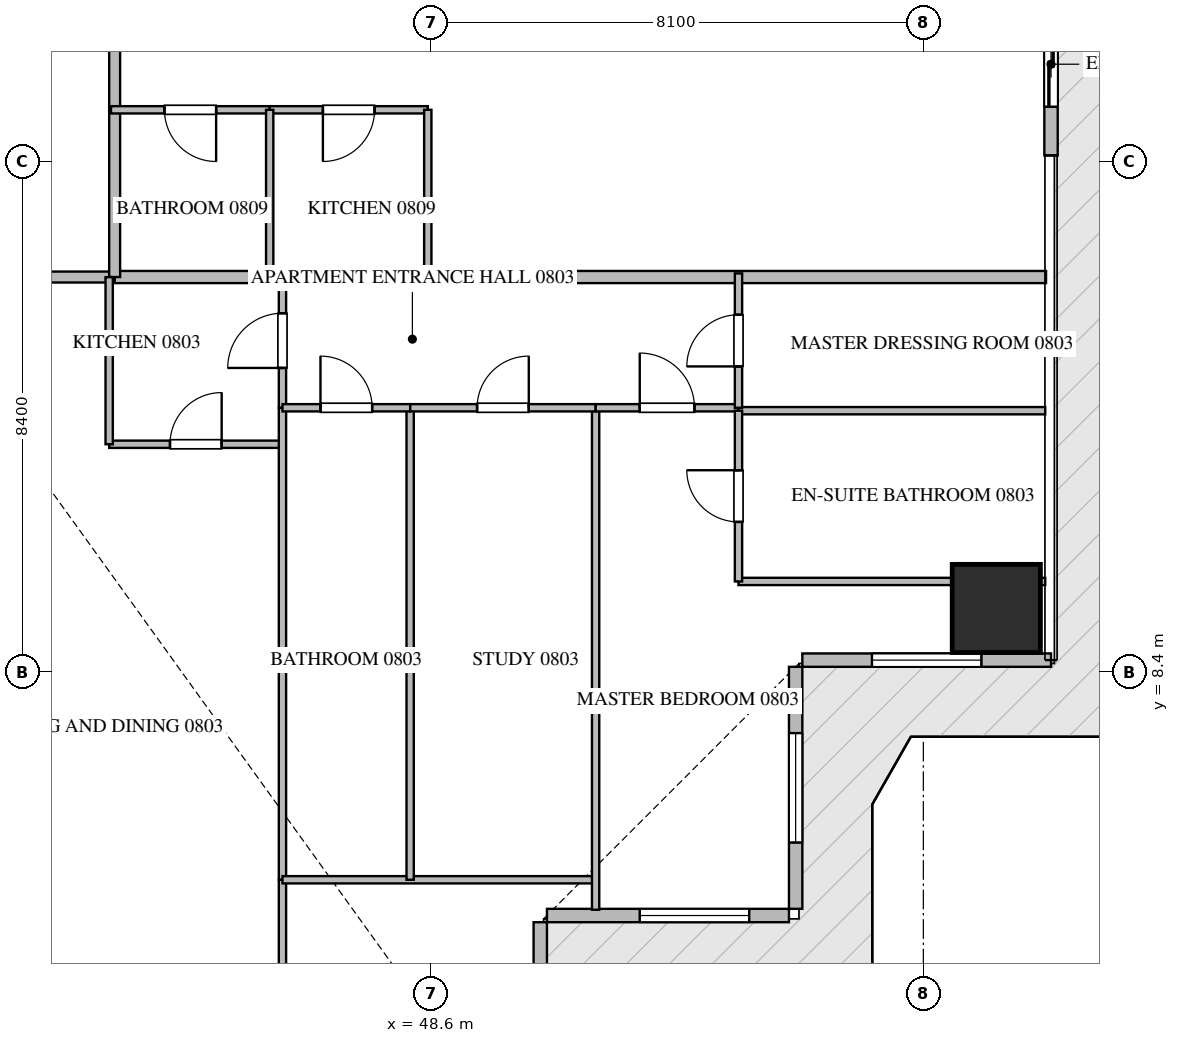
"""IFC4 building model, lengths in metres.
Left out: names, types, materials, properties, quantities, classifications, styles, units other than length and angle.
Written with IfcOpenShell. Run it as: python <this file> out.ifc"""

import sys

from ifc_helpers import new_model, si_unit, direction, frame, frame_2d, origin, origin_2d, place, context, subcontext, project, spatial, rectangle, extrude, source, transform, mapped, element, fill, save


model = new_model("IFC4")
c1 = context("Model", 3, precision=1e-05, world=origin(), true_north=direction((0.0, 1.0)))
c2 = subcontext(c1, "Body", "Model", "MODEL_VIEW")
j1 = project(units=[si_unit("LENGTHUNIT", "METRE"), si_unit("PLANEANGLEUNIT", "RADIAN")], contexts=[c1])
p1 = place(None, origin())
s1 = spatial("IfcSite", under=j1, at=p1, CompositionType="ELEMENT")
p2 = place(p1, origin())
s2 = spatial("IfcBuilding", under=s1, at=p2, CompositionType="ELEMENT")
p3 = place(p2, frame((0.0, 0.0, 37.95)))
s3 = spatial("IfcBuildingStorey", under=s2, at=p3, CompositionType="ELEMENT", Elevation=37.95)
m1 = source(origin(), c2, "Body", "SweptSolid", [
    extrude(rectangle(XDim=1.45, YDim=1.45, at=origin_2d()), origin(), (0.0, 0.0, 1.0), 3.75),
])
p4 = place(p3, frame((57.9, 9.45, -0.26), z_axis=(0.0, 0.0, 1.0), x_axis=(1.0, 0.0, 0.0)))
e1 = element("IfcColumn", 1, at=p4, inside=s3, PredefinedType="COLUMN", context=c2, shape_type="MappedRepresentation", body=[
    mapped(m1, transform((0.0, 0.0, 0.0), scale=1.0)),
])
p5 = place(p3, frame((50.4, 0.2, 0.0), z_axis=(0.0, 0.0, 1.0), x_axis=(0.0, 1.0, 0.0)))
e2 = element("IfcWall", 2, at=p5, inside=s3, PredefinedType="ELEMENTEDWALL", context=c2, shape_type="SweptSolid", body=[
    extrude(rectangle(XDim=4.09, YDim=0.22, at=frame_2d((2.045, 0.0))), origin(), (0.0, 0.0, 1.0), 3.475),
])
p6 = place(p5, frame((1.145, 0.0, 0.65)))
e3 = element("IfcOpeningElement", 3, at=p6, cuts=e2, PredefinedType="OPENING", context=c2, shape_type="SweptSolid", body=[
    extrude(rectangle(XDim=1.8, YDim=2.1, at=frame_2d((0.9, 1.05))), frame((0.0, 0.12, 0.0), z_axis=(0.0, -1.0, 0.0), x_axis=(1.0, 0.0, 0.0)), (0.0, 0.0, 1.0), 0.24),
])
p7 = place(p3, frame((50.51, 4.4, 0.0), z_axis=(0.0, 0.0, 1.0), x_axis=(1.0, 0.0, 0.0)))
e4 = element("IfcWall", 4, at=p7, inside=s3, PredefinedType="ELEMENTEDWALL", context=c2, shape_type="SweptSolid", body=[
    extrude(rectangle(XDim=3.98, YDim=0.22, at=frame_2d((1.99, 0.0))), origin(), (0.0, 0.0, 1.0), 3.475),
])
p8 = place(p7, frame((1.526, 0.0, 0.65)))
e5 = element("IfcOpeningElement", 5, at=p8, cuts=e4, PredefinedType="OPENING", context=c2, shape_type="SweptSolid", body=[
    extrude(rectangle(XDim=1.8, YDim=2.1, at=frame_2d((0.9, 1.05))), frame((0.0, 0.12, 0.0), z_axis=(0.0, -1.0, 0.0), x_axis=(1.0, 0.0, 0.0)), (0.0, 0.0, 1.0), 0.24),
])
p9 = place(p3, frame((54.6, 4.51, 0.0), z_axis=(0.0, 0.0, 1.0), x_axis=(0.0, 1.0, 0.0)))
e6 = element("IfcWall", 6, at=p9, inside=s3, PredefinedType="ELEMENTEDWALL", context=c2, shape_type="SweptSolid", body=[
    extrude(rectangle(XDim=3.98, YDim=0.22, at=frame_2d((1.99, 0.0))), origin(), (0.0, 0.0, 1.0), 3.475),
])
p10 = place(p9, frame((1.09, 0.0, 0.65)))
e7 = element("IfcOpeningElement", 7, at=p10, cuts=e6, PredefinedType="OPENING", context=c2, shape_type="SweptSolid", body=[
    extrude(rectangle(XDim=1.8, YDim=2.1, at=frame_2d((0.9, 1.05))), frame((0.0, 0.12, 0.0), z_axis=(0.0, -1.0, 0.0), x_axis=(1.0, 0.0, 0.0)), (0.0, 0.0, 1.0), 0.24),
])
p11 = place(p3, frame((54.71, 8.6, 0.0), z_axis=(0.0, 0.0, 1.0), x_axis=(1.0, 0.0, 0.0)))
e8 = element("IfcWall", 8, at=p11, inside=s3, PredefinedType="ELEMENTEDWALL", context=c2, shape_type="SweptSolid", body=[
    extrude(rectangle(XDim=4.09, YDim=0.22, at=frame_2d((2.045, 0.0))), origin(), (0.0, 0.0, 1.0), 3.475),
])
p12 = place(p11, frame((1.145, 0.0, 0.65)))
e9 = element("IfcOpeningElement", 9, at=p12, cuts=e8, PredefinedType="OPENING", context=c2, shape_type="SweptSolid", body=[
    extrude(rectangle(XDim=1.8, YDim=2.1, at=frame_2d((0.9, 1.05))), frame((0.0, 0.12, 0.0), z_axis=(0.0, -1.0, 0.0), x_axis=(1.0, 0.0, 0.0)), (0.0, 0.0, 1.0), 0.24),
])
p13 = place(p3, frame((58.8, 16.9, 0.0), z_axis=(0.0, 0.0, 1.0), x_axis=(0.0, 1.0, 0.0)))
e10 = element("IfcWall", 10, at=p13, inside=s3, PredefinedType="ELEMENTEDWALL", context=c2, shape_type="SweptSolid", body=[
    extrude(rectangle(XDim=3.0, YDim=0.22, at=frame_2d((1.5, 0.0))), origin(), (0.0, 0.0, 1.0), 3.475),
])
p14 = place(p13, frame((0.8, 0.0, 0.0)))
e11 = element("IfcOpeningElement", 11, at=p14, cuts=e10, PredefinedType="OPENING", context=c2, shape_type="SweptSolid", body=[
    extrude(rectangle(XDim=1.4, YDim=2.25, at=frame_2d((0.7, 1.125))), frame((0.0, 0.12, 0.0), z_axis=(0.0, -1.0, 0.0), x_axis=(1.0, 0.0, 0.0)), (0.0, 0.0, 1.0), 0.24),
])
p15 = place(p3, frame((43.4, 14.9, 0.0), z_axis=(0.0, 0.0, 1.0), x_axis=(1.0, 0.0, 0.0)))
e12 = element("IfcWall", 12, at=p15, inside=s3, PredefinedType="PARTITIONING", context=c2, shape_type="SweptSolid", body=[
    extrude(rectangle(XDim=15.318, YDim=0.2, at=frame_2d((7.659, 0.0))), origin(), (0.0, 0.0, 1.0), 3.49),
])
p16 = place(p3, frame((21.402, 14.9, 0.0), z_axis=(0.0, 0.0, 1.0), x_axis=(1.0, 0.0, 0.0)))
e13 = element("IfcWall", 13, at=p16, inside=s3, PredefinedType="PARTITIONING", context=c2, shape_type="SweptSolid", body=[
    extrude(rectangle(XDim=21.996, YDim=0.18, at=frame_2d((10.998, 0.0))), origin(), (0.0, 0.0, 1.0), 3.49),
])
p17 = place(p16, frame((2.1, 0.0, 0.0)))
e14 = element("IfcOpeningElement", 14, at=p17, cuts=e13, PredefinedType="OPENING", context=c2, shape_type="SweptSolid", body=[
    extrude(rectangle(XDim=1.0, YDim=2.15, at=frame_2d((0.5, 1.075))), frame((0.0, 0.1, 0.0), z_axis=(0.0, -1.0, 0.0), x_axis=(1.0, 0.0, 0.0)), (0.0, 0.0, 1.0), 0.2),
])
p18 = place(p16, frame((14.109, 0.0, 0.0)))
e15 = element("IfcOpeningElement", 15, at=p18, cuts=e13, PredefinedType="OPENING", context=c2, shape_type="SweptSolid", body=[
    extrude(rectangle(XDim=1.0, YDim=2.15, at=frame_2d((0.5, 1.075))), frame((0.0, 0.1, 0.0), z_axis=(0.0, -1.0, 0.0), x_axis=(1.0, 0.0, 0.0)), (0.0, 0.0, 1.0), 0.2),
])
p19 = place(p16, frame((18.896, 0.0, 0.0)))
e16 = element("IfcOpeningElement", 16, at=p19, cuts=e13, PredefinedType="OPENING", context=c2, shape_type="SweptSolid", body=[
    extrude(rectangle(XDim=1.0, YDim=2.15, at=frame_2d((0.5, 1.075))), frame((0.0, 0.1, 0.0), z_axis=(0.0, -1.0, 0.0), x_axis=(1.0, 0.0, 0.0)), (0.0, 0.0, 1.0), 0.2),
])
p20 = place(p3, frame((43.4, 14.9, 0.0), z_axis=(0.0, 0.0, 1.0), x_axis=(0.0, 1.0, 0.0)))
e17 = element("IfcWall", 17, at=p20, inside=s3, PredefinedType="PARTITIONING", context=c2, shape_type="SweptSolid", body=[
    extrude(rectangle(XDim=20.6, YDim=0.18, at=frame_2d((10.3, 0.0))), origin(), (0.0, 0.0, 1.0), 3.49),
])
p21 = place(p20, frame((5.723, 0.0, 0.0)))
e18 = element("IfcOpeningElement", 18, at=p21, cuts=e17, PredefinedType="OPENING", context=c2, shape_type="SweptSolid", body=[
    extrude(rectangle(XDim=1.0, YDim=2.15, at=frame_2d((0.5, 1.075))), frame((0.0, 0.1, 0.0), z_axis=(0.0, -1.0, 0.0), x_axis=(1.0, 0.0, 0.0)), (0.0, 0.0, 1.0), 0.2),
])
p22 = place(p20, frame((17.64, 0.0, 0.0)))
e19 = element("IfcOpeningElement", 19, at=p22, cuts=e17, PredefinedType="OPENING", context=c2, shape_type="SweptSolid", body=[
    extrude(rectangle(XDim=1.0, YDim=2.15, at=frame_2d((0.5, 1.075))), frame((0.0, 0.1, 0.0), z_axis=(0.0, -1.0, 0.0), x_axis=(1.0, 0.0, 0.0)), (0.0, 0.0, 1.0), 0.2),
])
p23 = place(p3, frame((43.31, 12.15, 0.0), z_axis=(0.0, 0.0, 1.0), x_axis=(1.0, 0.0, 0.0)))
e20 = element("IfcWall", 20, at=p23, inside=s3, PredefinedType="PARTITIONING", context=c2, shape_type="SweptSolid", body=[
    extrude(rectangle(XDim=2.85, YDim=0.12, at=frame_2d((1.425, 0.0))), origin(), (0.0, 0.0, 1.0), 3.49),
])
p24 = place(p23, frame((1.0, 0.0, 0.0)))
e21 = element("IfcOpeningElement", 21, at=p24, cuts=e20, PredefinedType="OPENING", context=c2, shape_type="SweptSolid", body=[
    extrude(rectangle(XDim=0.85, YDim=2.1, at=frame_2d((0.425, 1.05))), frame((0.0, 0.07, 0.0), z_axis=(0.0, -1.0, 0.0), x_axis=(1.0, 0.0, 0.0)), (0.0, 0.0, 1.0), 0.14),
])
p25 = place(p3, frame((43.31, 12.15, 0.0), z_axis=(0.0, 0.0, 1.0), x_axis=(0.0, 1.0, 0.0)))
e22 = element("IfcWall", 22, at=p25, inside=s3, PredefinedType="PARTITIONING", context=c2, shape_type="SweptSolid", body=[
    extrude(rectangle(XDim=2.748, YDim=0.12, at=frame_2d((1.374, 0.0))), origin(), (0.0, 0.0, 1.0), 3.49),
])
p26 = place(p3, frame((46.16, 12.75, 0.0), z_axis=(0.0, 0.0, 1.0), x_axis=(0.0, 1.0, 0.0)))
e23 = element("IfcWall", 23, at=p26, inside=s3, PredefinedType="PARTITIONING", context=c2, shape_type="SweptSolid", body=[
    extrude(rectangle(XDim=2.21, YDim=0.12, at=frame_2d((1.105, 0.0))), origin(), (0.0, 0.0, 1.0), 3.49),
])
p27 = place(p26, frame((0.655, 0.0, 0.0)))
e24 = element("IfcOpeningElement", 24, at=p27, cuts=e23, PredefinedType="OPENING", context=c2, shape_type="SweptSolid", body=[
    extrude(rectangle(XDim=0.9, YDim=2.1, at=frame_2d((0.45, 1.05))), frame((0.0, 0.07, 0.0), z_axis=(0.0, -1.0, 0.0), x_axis=(1.0, 0.0, 0.0)), (0.0, 0.0, 1.0), 0.14),
])
p28 = place(p3, frame((46.16, 0.295, 0.0), z_axis=(0.0, 0.0, 1.0), x_axis=(0.0, 1.0, 0.0)))
e25 = element("IfcWall", 25, at=p28, inside=s3, PredefinedType="PARTITIONING", context=c2, shape_type="SweptSolid", body=[
    extrude(rectangle(XDim=4.693, YDim=0.12, at=frame_2d((2.347, 0.0))), origin(), (0.0, 0.0, 1.0), 3.49),
])
p29 = place(p28, frame((2.086, 0.0, 0.0)))
e26 = element("IfcOpeningElement", 26, at=p29, cuts=e25, PredefinedType="OPENING", context=c2, shape_type="SweptSolid", body=[
    extrude(rectangle(XDim=0.9, YDim=2.1, at=frame_2d((0.45, 1.05))), frame((0.0, 0.07, 0.0), z_axis=(0.0, -1.0, 0.0), x_axis=(1.0, 0.0, 0.0)), (0.0, 0.0, 1.0), 0.14),
])
p30 = place(p3, frame((46.16, 4.99, 0.0), z_axis=(0.0, 0.0, 1.0), x_axis=(0.0, 1.0, 0.0)))
e27 = element("IfcWall", 27, at=p30, inside=s3, PredefinedType="PARTITIONING", context=c2, shape_type="SweptSolid", body=[
    extrude(rectangle(XDim=7.758, YDim=0.12, at=frame_2d((3.879, 0.0))), origin(), (0.0, 0.0, 1.0), 3.49),
])
p31 = place(p3, frame((46.16, 4.988, 0.0), z_axis=(0.0, 0.0, 1.0), x_axis=(1.0, 0.0, 0.0)))
e28 = element("IfcWall", 28, at=p31, inside=s3, PredefinedType="PARTITIONING", context=c2, shape_type="SweptSolid", body=[
    extrude(rectangle(XDim=5.15, YDim=0.12, at=frame_2d((2.575, 0.0))), origin(), (0.0, 0.0, 1.0), 3.49),
])
p32 = place(p3, frame((51.31, 4.495, 0.0), z_axis=(0.0, 0.0, 1.0), x_axis=(0.0, 1.0, 0.0)))
e29 = element("IfcWall", 29, at=p32, inside=s3, PredefinedType="PARTITIONING", context=c2, shape_type="SweptSolid", body=[
    extrude(rectangle(XDim=8.255, YDim=0.12, at=frame_2d((4.127, 0.0))), origin(), (0.0, 0.0, 1.0), 3.49),
])
p33 = place(p3, frame((48.26, 4.988, 0.0), z_axis=(0.0, 0.0, 1.0), x_axis=(0.0, 1.0, 0.0)))
e30 = element("IfcWall", 30, at=p33, inside=s3, PredefinedType="PARTITIONING", context=c2, shape_type="SweptSolid", body=[
    extrude(rectangle(XDim=7.762, YDim=0.12, at=frame_2d((3.881, 0.0))), origin(), (0.0, 0.0, 1.0), 3.49),
])
p34 = place(p3, frame((46.16, 12.75, 0.0), z_axis=(0.0, 0.0, 1.0), x_axis=(1.0, 0.0, 0.0)))
e31 = element("IfcWall", 31, at=p34, inside=s3, PredefinedType="PARTITIONING", context=c2, shape_type="SweptSolid", body=[
    extrude(rectangle(XDim=2.1, YDim=0.12, at=frame_2d((1.05, 0.0))), origin(), (0.0, 0.0, 1.0), 3.49),
])
p35 = place(p34, frame((0.625, 0.0, 0.0)))
e32 = element("IfcOpeningElement", 32, at=p35, cuts=e31, PredefinedType="OPENING", context=c2, shape_type="SweptSolid", body=[
    extrude(rectangle(XDim=0.85, YDim=2.1, at=frame_2d((0.425, 1.05))), frame((0.0, 0.07, 0.0), z_axis=(0.0, -1.0, 0.0), x_axis=(1.0, 0.0, 0.0)), (0.0, 0.0, 1.0), 0.14),
])
p36 = place(p3, frame((48.262, 12.75, 0.0), z_axis=(0.0, 0.0, 1.0), x_axis=(1.0, 0.0, 0.0)))
e33 = element("IfcWall", 33, at=p36, inside=s3, PredefinedType="PARTITIONING", context=c2, shape_type="SweptSolid", body=[
    extrude(rectangle(XDim=3.048, YDim=0.12, at=frame_2d((1.524, 0.0))), origin(), (0.0, 0.0, 1.0), 3.49),
])
p37 = place(p36, frame((1.099, 0.0, 0.0)))
e34 = element("IfcOpeningElement", 34, at=p37, cuts=e33, PredefinedType="OPENING", context=c2, shape_type="SweptSolid", body=[
    extrude(rectangle(XDim=0.85, YDim=2.1, at=frame_2d((0.425, 1.05))), frame((0.0, 0.07, 0.0), z_axis=(0.0, -1.0, 0.0), x_axis=(1.0, 0.0, 0.0)), (0.0, 0.0, 1.0), 0.14),
])
p38 = place(p3, frame((51.312, 12.75, 0.0), z_axis=(0.0, 0.0, 1.0), x_axis=(1.0, 0.0, 0.0)))
e35 = element("IfcWall", 35, at=p38, inside=s3, PredefinedType="PARTITIONING", context=c2, shape_type="SweptSolid", body=[
    extrude(rectangle(XDim=2.348, YDim=0.12, at=frame_2d((1.174, 0.0))), origin(), (0.0, 0.0, 1.0), 3.49),
])
p39 = place(p38, frame((0.724, 0.0, 0.0)))
e36 = element("IfcOpeningElement", 36, at=p39, cuts=e35, PredefinedType="OPENING", context=c2, shape_type="SweptSolid", body=[
    extrude(rectangle(XDim=0.9, YDim=2.1, at=frame_2d((0.45, 1.05))), frame((0.0, 0.07, 0.0), z_axis=(0.0, -1.0, 0.0), x_axis=(1.0, 0.0, 0.0)), (0.0, 0.0, 1.0), 0.14),
])
p40 = place(p3, frame((53.66, 9.894, 0.0), z_axis=(0.0, 0.0, 1.0), x_axis=(1.0, 0.0, 0.0)))
e37 = element("IfcWall", 37, at=p40, inside=s3, PredefinedType="PARTITIONING", context=c2, shape_type="SweptSolid", body=[
    extrude(rectangle(XDim=5.045, YDim=0.12, at=frame_2d((2.522, 0.0))), origin(), (0.0, 0.0, 1.0), 3.49),
])
p41 = place(p3, frame((53.662, 12.702, 0.0), z_axis=(0.0, 0.0, 1.0), x_axis=(1.0, 0.0, 0.0)))
e38 = element("IfcWall", 38, at=p41, inside=s3, PredefinedType="PARTITIONING", context=c2, shape_type="SweptSolid", body=[
    extrude(rectangle(XDim=5.043, YDim=0.12, at=frame_2d((2.521, 0.0))), origin(), (0.0, 0.0, 1.0), 3.49),
])
p42 = place(p3, frame((53.66, 9.894, 0.0), z_axis=(0.0, 0.0, 1.0), x_axis=(0.0, 1.0, 0.0)))
e39 = element("IfcWall", 39, at=p42, inside=s3, PredefinedType="PARTITIONING", context=c2, shape_type="SweptSolid", body=[
    extrude(rectangle(XDim=2.808, YDim=0.12, at=frame_2d((1.404, 0.0))), origin(), (0.0, 0.0, 1.0), 3.49),
])
p43 = place(p42, frame((0.979, 0.0, 0.0)))
e40 = element("IfcOpeningElement", 40, at=p43, cuts=e39, PredefinedType="OPENING", context=c2, shape_type="SweptSolid", body=[
    extrude(rectangle(XDim=0.85, YDim=2.1, at=frame_2d((0.425, 1.05))), frame((0.0, 0.07, 0.0), z_axis=(0.0, -1.0, 0.0), x_axis=(1.0, 0.0, 0.0)), (0.0, 0.0, 1.0), 0.14),
])
p44 = place(p3, frame((53.66, 12.75, 0.0), z_axis=(0.0, 0.0, 1.0), x_axis=(0.0, 1.0, 0.0)))
e41 = element("IfcWall", 41, at=p44, inside=s3, PredefinedType="PARTITIONING", context=c2, shape_type="SweptSolid", body=[
    extrude(rectangle(XDim=2.21, YDim=0.12, at=frame_2d((1.105, 0.0))), origin(), (0.0, 0.0, 1.0), 3.49),
])
p45 = place(p44, frame((0.68, 0.0, 0.0)))
e42 = element("IfcOpeningElement", 42, at=p45, cuts=e41, PredefinedType="OPENING", context=c2, shape_type="SweptSolid", body=[
    extrude(rectangle(XDim=0.85, YDim=2.1, at=frame_2d((0.425, 1.05))), frame((0.0, 0.07, 0.0), z_axis=(0.0, -1.0, 0.0), x_axis=(1.0, 0.0, 0.0)), (0.0, 0.0, 1.0), 0.14),
])
p46 = place(p3, frame((48.55, 17.65, 0.0), z_axis=(0.0, 0.0, 1.0), x_axis=(-1.0, 0.0, 0.0)))
e43 = element("IfcWall", 43, at=p46, inside=s3, PredefinedType="PARTITIONING", context=c2, shape_type="SweptSolid", body=[
    extrude(rectangle(XDim=2.6, YDim=0.12, at=frame_2d((1.3, 0.0))), origin(), (0.0, 0.0, 1.0), 3.49),
])
p47 = place(p46, frame((0.875, 0.0, 0.0)))
e44 = element("IfcOpeningElement", 44, at=p47, cuts=e43, PredefinedType="OPENING", context=c2, shape_type="SweptSolid", body=[
    extrude(rectangle(XDim=0.85, YDim=2.1, at=frame_2d((0.425, 1.05))), frame((0.0, 0.07, 0.0), z_axis=(0.0, -1.0, 0.0), x_axis=(1.0, 0.0, 0.0)), (0.0, 0.0, 1.0), 0.14),
])
p48 = place(p3, frame((45.948, 17.65, 0.0), z_axis=(0.0, 0.0, 1.0), x_axis=(-1.0, 0.0, 0.0)))
e45 = element("IfcWall", 45, at=p48, inside=s3, PredefinedType="PARTITIONING", context=c2, shape_type="SweptSolid", body=[
    extrude(rectangle(XDim=2.608, YDim=0.12, at=frame_2d((1.304, 0.0))), origin(), (0.0, 0.0, 1.0), 3.49),
])
p49 = place(p48, frame((0.879, 0.0, 0.0)))
e46 = element("IfcOpeningElement", 46, at=p49, cuts=e45, PredefinedType="OPENING", context=c2, shape_type="SweptSolid", body=[
    extrude(rectangle(XDim=0.85, YDim=2.1, at=frame_2d((0.425, 1.05))), frame((0.0, 0.07, 0.0), z_axis=(0.0, -1.0, 0.0), x_axis=(1.0, 0.0, 0.0)), (0.0, 0.0, 1.0), 0.14),
])
for number, where, z_axis, x_axis in (
    (47, (45.95, 14.84, 0.0), (0.0, 0.0, 1.0), (0.0, 1.0, 0.0)),
    (48, (48.55, 14.84, 0.0), (0.0, 0.0, 1.0), (0.0, 1.0, 0.0)),
):
    element("IfcWall", number, at=place(p3, frame(where, z_axis=z_axis, x_axis=x_axis)), inside=s3, PredefinedType="PARTITIONING", context=c2, shape_type="SweptSolid", body=[
        extrude(rectangle(XDim=2.81, YDim=0.12, at=frame_2d((1.405, 0.0))), origin(), (0.0, 0.0, 1.0), 3.49),
    ])
m2 = source(origin(), c2, "Body", "SweptSolid", [
    extrude(rectangle(XDim=1.8, YDim=2.1, at=frame_2d((0.9, 1.05))), frame((0.0, 0.03, 0.0), z_axis=(0.0, -1.0, 0.0), x_axis=(1.0, 0.0, 0.0)), (0.0, 0.0, 1.0), 0.06),
])
p50 = place(p8, origin())
e49 = element("IfcWindow", 49, at=p50, inside=s3, PartitioningType="SINGLE_PANEL", PredefinedType="WINDOW", context=c2, shape_type="MappedRepresentation", body=[
    mapped(m2, transform((0.0, 0.0, 0.0), scale=1.0)),
])
fill(e5, e49)
p51 = place(p10, origin())
e50 = element("IfcWindow", 50, at=p51, inside=s3, PartitioningType="SINGLE_PANEL", PredefinedType="WINDOW", context=c2, shape_type="MappedRepresentation", body=[
    mapped(m2, transform((0.0, 0.0, 0.0), scale=1.0)),
])
fill(e7, e50)
p52 = place(p12, origin())
e51 = element("IfcWindow", 51, at=p52, inside=s3, PartitioningType="SINGLE_PANEL", PredefinedType="WINDOW", context=c2, shape_type="MappedRepresentation", body=[
    mapped(m2, transform((0.0, 0.0, 0.0), scale=1.0)),
])
fill(e9, e51)
m3 = source(origin(), c2, "Body", "SweptSolid", [
    extrude(rectangle(XDim=1.4, YDim=2.25, at=frame_2d((0.7, 1.125))), frame((0.0, 0.025, 0.0), z_axis=(0.0, -1.0, 0.0), x_axis=(1.0, 0.0, 0.0)), (0.0, 0.0, 1.0), 0.05),
])
p53 = place(p14, origin())
e52 = element("IfcDoor", 52, at=p53, inside=s3, OperationType="SLIDING_TO_LEFT", PredefinedType="DOOR", context=c2, shape_type="MappedRepresentation", body=[
    mapped(m3, transform((0.0, 0.0, 0.0), scale=1.0)),
])
fill(e11, e52)
m4 = source(origin(), c2, "Body", "SweptSolid", [
    extrude(rectangle(XDim=0.85, YDim=2.1, at=frame_2d((0.425, 1.05))), frame((0.0, 0.025, 0.0), z_axis=(0.0, -1.0, 0.0), x_axis=(1.0, 0.0, 0.0)), (0.0, 0.0, 1.0), 0.05),
])
p54 = place(p24, origin())
e53 = element("IfcDoor", 53, at=p54, inside=s3, OperationType="SINGLE_SWING_RIGHT", PredefinedType="DOOR", context=c2, shape_type="MappedRepresentation", body=[
    mapped(m4, transform((0.0, 0.0, 0.0), scale=1.0)),
])
fill(e21, e53)
m5 = source(origin(), c2, "Body", "SweptSolid", [
    extrude(rectangle(XDim=0.9, YDim=2.1, at=frame_2d((0.45, 1.05))), frame((0.0, 0.025, 0.0), z_axis=(0.0, -1.0, 0.0), x_axis=(1.0, 0.0, 0.0)), (0.0, 0.0, 1.0), 0.05),
])
p55 = place(p27, origin())
e54 = element("IfcDoor", 54, at=p55, inside=s3, OperationType="SINGLE_SWING_LEFT", PredefinedType="DOOR", context=c2, shape_type="MappedRepresentation", body=[
    mapped(m5, transform((0.0, 0.0, 0.0), scale=1.0)),
])
fill(e24, e54)
p56 = place(p35, origin())
e55 = element("IfcDoor", 55, at=p56, inside=s3, OperationType="SINGLE_SWING_LEFT", PredefinedType="DOOR", context=c2, shape_type="MappedRepresentation", body=[
    mapped(m4, transform((0.0, 0.0, 0.0), scale=1.0)),
])
fill(e32, e55)
p57 = place(p37, origin())
e56 = element("IfcDoor", 56, at=p57, inside=s3, OperationType="SINGLE_SWING_RIGHT", PredefinedType="DOOR", context=c2, shape_type="MappedRepresentation", body=[
    mapped(m4, transform((0.0, 0.0, 0.0), scale=1.0)),
])
fill(e34, e56)
p58 = place(p39, origin())
e57 = element("IfcDoor", 57, at=p58, inside=s3, OperationType="SINGLE_SWING_LEFT", PredefinedType="DOOR", context=c2, shape_type="MappedRepresentation", body=[
    mapped(m5, transform((0.0, 0.0, 0.0), scale=1.0)),
])
fill(e36, e57)
p59 = place(p43, origin())
e58 = element("IfcDoor", 58, at=p59, inside=s3, OperationType="SINGLE_SWING_RIGHT", PredefinedType="DOOR", context=c2, shape_type="MappedRepresentation", body=[
    mapped(m4, transform((0.0, 0.0, 0.0), scale=1.0)),
])
fill(e40, e58)
p60 = place(p45, origin())
e59 = element("IfcDoor", 59, at=p60, inside=s3, OperationType="SINGLE_SWING_LEFT", PredefinedType="DOOR", context=c2, shape_type="MappedRepresentation", body=[
    mapped(m4, transform((0.0, 0.0, 0.0), scale=1.0)),
])
fill(e42, e59)
p61 = place(p47, origin())
e60 = element("IfcDoor", 60, at=p61, inside=s3, OperationType="SINGLE_SWING_RIGHT", PredefinedType="DOOR", context=c2, shape_type="MappedRepresentation", body=[
    mapped(m4, transform((0.0, 0.0, 0.0), scale=1.0)),
])
fill(e44, e60)
p62 = place(p49, origin())
e61 = element("IfcDoor", 61, at=p62, inside=s3, OperationType="SINGLE_SWING_LEFT", PredefinedType="DOOR", context=c2, shape_type="MappedRepresentation", body=[
    mapped(m4, transform((0.0, 0.0, 0.0), scale=1.0)),
])
fill(e46, e61)
save(model, sys.argv[1])
